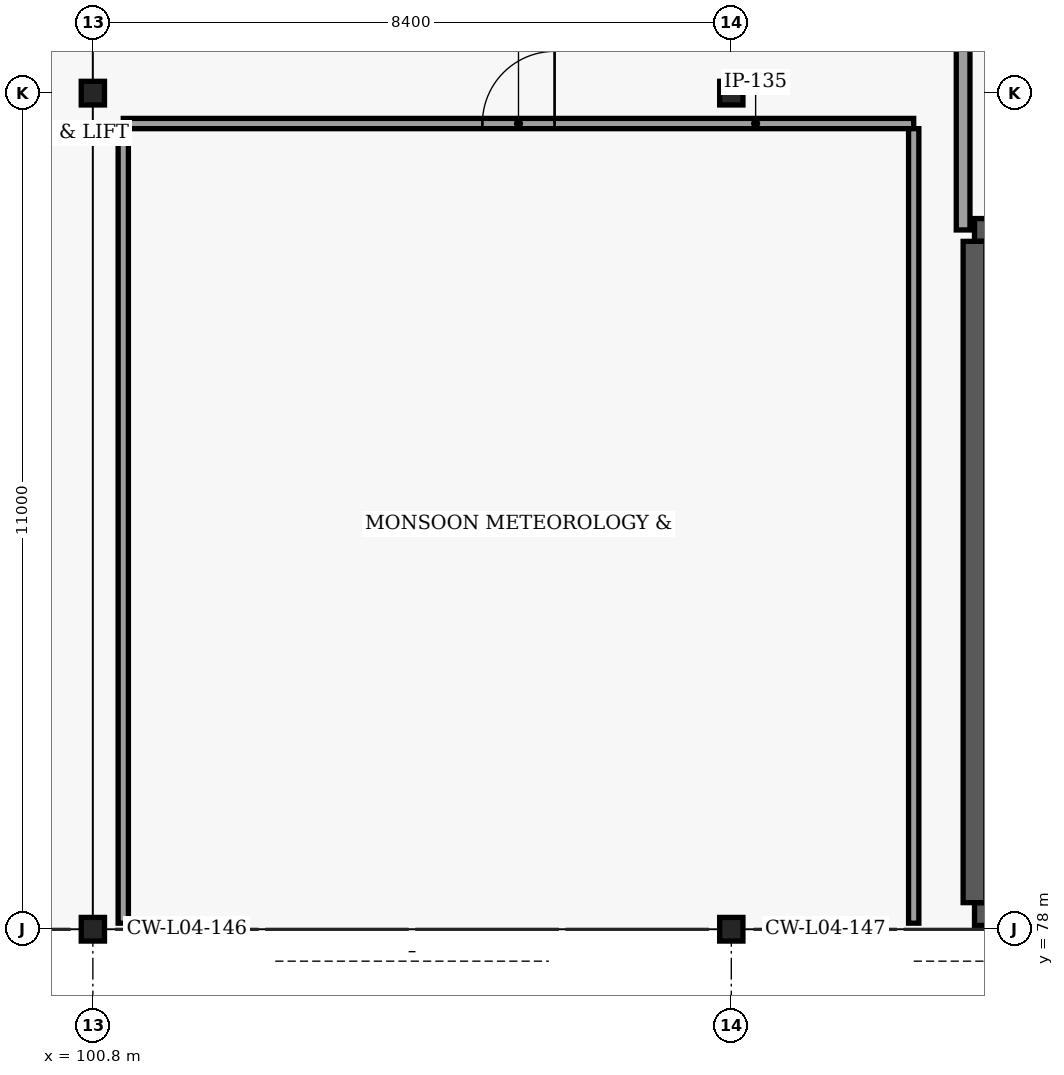
"""IFC4 building model, lengths in metres.
Left out: names, types, materials, properties, quantities, classifications, styles, units other than length and angle.
Written with IfcOpenShell. Run it as: python <this file> out.ifc"""

import sys

from ifc_helpers import new_model, si_unit, direction, frame, frame_2d, origin, origin_2d, place, context, subcontext, project, spatial, rectangle, i_section, extrude, element, fill, save


model = new_model("IFC4")
c1 = context("Model", 3, precision=1e-05, world=origin(), true_north=direction((0.0, 1.0)))
c2 = subcontext(c1, "Body", "Model", "MODEL_VIEW")
j1 = project(units=[si_unit("LENGTHUNIT", "METRE"), si_unit("PLANEANGLEUNIT", "RADIAN")], contexts=[c1])
p1 = place(None, origin())
s1 = spatial("IfcSite", under=j1, at=p1, CompositionType="ELEMENT")
p2 = place(p1, origin())
s2 = spatial("IfcBuilding", under=s1, at=p2, CompositionType="ELEMENT")
p3 = place(p2, frame((0.0, 0.0, 14.4)))
s3 = spatial("IfcBuildingStorey", under=s2, at=p3, CompositionType="ELEMENT", Elevation=14.4)
for number, where, z_axis, x_axis in (
    (1, (100.8, 78.0, 0.0), (0.0, 0.0, 1.0), (1.0, 0.0, 0.0)),
    (2, (109.2, 78.0, 0.0), (0.0, 0.0, 1.0), (1.0, 0.0, 0.0)),
    (3, (100.8, 89.0, 0.0), (0.0, 0.0, 1.0), (1.0, 0.0, 0.0)),
    (4, (109.2, 89.0, 0.0), (0.0, 0.0, 1.0), (1.0, 0.0, 0.0)),
):
    element("IfcColumn", number, at=place(p3, frame(where, z_axis=z_axis, x_axis=x_axis)), inside=s3, PredefinedType="COLUMN", context=c2, shape_type="SweptSolid", body=[
        extrude(i_section(OverallWidth=0.306, OverallDepth=0.311, WebThickness=0.011, FlangeThickness=0.017, FilletRadius=0.015, at=origin_2d()), origin(), (0.0, 0.0, 1.0), 3.95),
    ])
p4 = place(p3, frame((112.4, 78.2, 0.0), z_axis=(0.0, 0.0, 1.0), x_axis=(1.0, 0.0, 0.0)))
e5 = element("IfcWall", 5, at=p4, inside=s3, PredefinedType="SHEAR", context=c2, shape_type="SweptSolid", body=[
    extrude(rectangle(XDim=4.1, YDim=0.3, at=frame_2d((2.05, 0.0))), origin(), (0.0, 0.0, 1.0), 3.95),
])
p5 = place(p3, frame((112.4, 87.2, 0.0), z_axis=(0.0, 0.0, 1.0), x_axis=(1.0, 0.0, 0.0)))
e6 = element("IfcWall", 6, at=p5, inside=s3, PredefinedType="SHEAR", context=c2, shape_type="SweptSolid", body=[
    extrude(rectangle(XDim=4.1, YDim=0.3, at=frame_2d((2.05, 0.0))), origin(), (0.0, 0.0, 1.0), 3.95),
])
p6 = place(p5, frame((1.5, 0.0, 0.0)))
e7 = element("IfcOpeningElement", 7, at=p6, cuts=e6, PredefinedType="OPENING", context=c2, shape_type="SweptSolid", body=[
    extrude(rectangle(XDim=1.1, YDim=2.2, at=frame_2d((0.55, 1.1))), frame((0.0, 0.16, 0.0), z_axis=(0.0, -1.0, 0.0), x_axis=(1.0, 0.0, 0.0)), (0.0, 0.0, 1.0), 0.32),
])
p7 = place(p3, frame((112.4, 78.35, 0.0), z_axis=(0.0, 0.0, 1.0), x_axis=(0.0, 1.0, 0.0)))
e8 = element("IfcWall", 8, at=p7, inside=s3, PredefinedType="SHEAR", context=c2, shape_type="SweptSolid", body=[
    extrude(rectangle(XDim=8.7, YDim=0.3, at=frame_2d((4.35, 0.0))), origin(), (0.0, 0.0, 1.0), 3.95),
])
p8 = place(p3, frame((112.25, 87.2, 0.0), z_axis=(0.0, 0.0, 1.0), x_axis=(0.0, 1.0, 0.0)))
e9 = element("IfcWall", 9, at=p8, inside=s3, PredefinedType="SOLIDWALL", context=c2, shape_type="SweptSolid", body=[
    extrude(rectangle(XDim=2.51, YDim=0.18, at=frame_2d((1.255, 0.0))), origin(), (0.0, 0.0, 1.0), 3.533),
])
p9 = place(p3, frame((101.2, 88.6, 0.0), z_axis=(0.0, 0.0, 1.0), x_axis=(1.0, 0.0, 0.0)))
e10 = element("IfcWall", 10, at=p9, inside=s3, PredefinedType="PARTITIONING", context=c2, shape_type="SweptSolid", body=[
    extrude(rectangle(XDim=10.4, YDim=0.135, at=frame_2d((5.2, 0.0))), origin(), (0.0, 0.0, 1.0), 3.54),
])
p10 = place(p9, frame((4.725, 0.0, 0.0)))
e11 = element("IfcOpeningElement", 11, at=p10, cuts=e10, PredefinedType="OPENING", context=c2, shape_type="SweptSolid", body=[
    extrude(rectangle(XDim=0.95, YDim=2.15, at=frame_2d((0.475, 1.075))), frame((0.0, 0.077, 0.0), z_axis=(0.0, -1.0, 0.0), x_axis=(1.0, 0.0, 0.0)), (0.0, 0.0, 1.0), 0.155),
])
p11 = place(p3, frame((101.2, 78.08, 0.0), z_axis=(0.0, 0.0, 1.0), x_axis=(0.0, 1.0, 0.0)))
e12 = element("IfcWall", 12, at=p11, inside=s3, PredefinedType="PARTITIONING", context=c2, shape_type="SweptSolid", body=[
    extrude(rectangle(XDim=10.452, YDim=0.135, at=frame_2d((5.226, 0.0))), origin(), (0.0, 0.0, 1.0), 3.637),
])
p12 = place(p3, frame((111.6, 78.08, 0.0), z_axis=(0.0, 0.0, 1.0), x_axis=(0.0, 1.0, 0.0)))
e13 = element("IfcWall", 13, at=p12, inside=s3, PredefinedType="PARTITIONING", context=c2, shape_type="SweptSolid", body=[
    extrude(rectangle(XDim=10.452, YDim=0.135, at=frame_2d((5.226, 0.0))), origin(), (0.0, 0.0, 1.0), 3.9),
])
p13 = place(p10, origin())
e14 = element("IfcDoor", 14, at=p13, inside=s3, OperationType="SINGLE_SWING_RIGHT", PredefinedType="DOOR", context=c2, shape_type="SweptSolid", body=[
    extrude(rectangle(XDim=0.95, YDim=2.15, at=frame_2d((0.475, 1.075))), frame((0.0, 0.025, 0.0), z_axis=(0.0, -1.0, 0.0), x_axis=(1.0, 0.0, 0.0)), (0.0, 0.0, 1.0), 0.05),
])
fill(e11, e14)
save(model, sys.argv[1])
